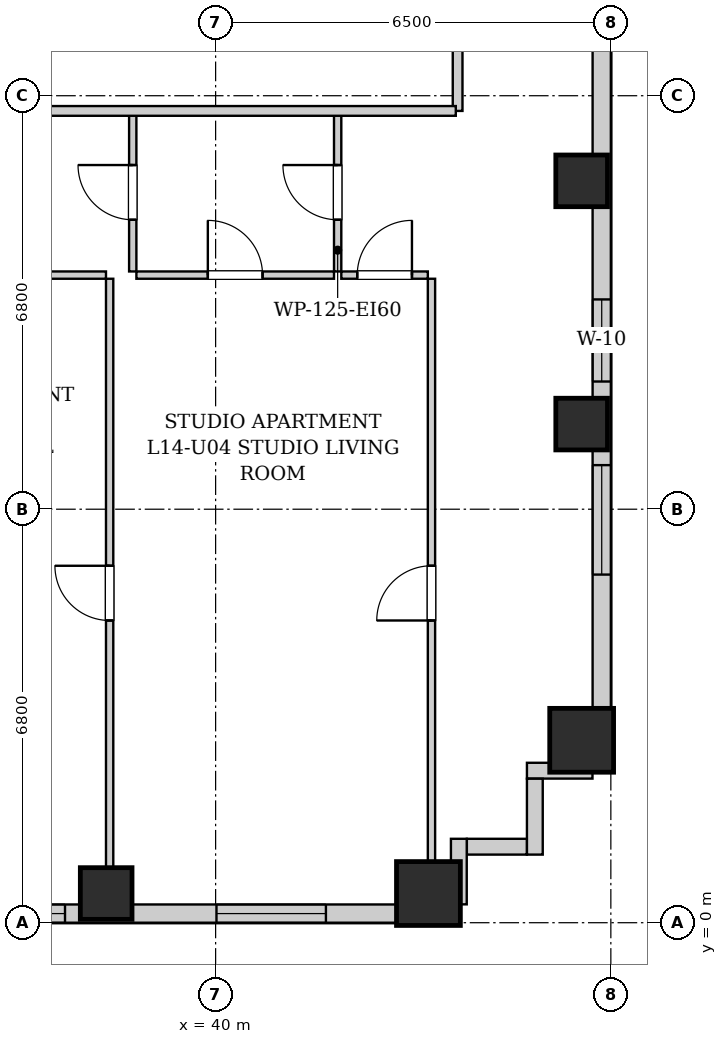
"""IFC4 building model, lengths in metres.
Left out: names, types, materials, properties, quantities, classifications, styles, units other than length and angle.
Written with IfcOpenShell. Run it as: python <this file> out.ifc"""

import sys

from ifc_helpers import new_model, si_unit, direction, frame, frame_2d, origin, origin_2d, place, context, subcontext, project, spatial, rectangle, extrude, element, fill, save


model = new_model("IFC4")
c1 = context("Model", 3, precision=1e-05, world=origin(), true_north=direction((0.0, 1.0)))
c2 = subcontext(c1, "Body", "Model", "MODEL_VIEW")
j1 = project(units=[si_unit("LENGTHUNIT", "METRE"), si_unit("PLANEANGLEUNIT", "RADIAN")], contexts=[c1])
p1 = place(None, origin())
s1 = spatial("IfcSite", under=j1, at=p1, CompositionType="ELEMENT")
p2 = place(p1, origin())
s2 = spatial("IfcBuilding", under=s1, at=p2, CompositionType="ELEMENT")
p3 = place(p2, frame((0.0, 0.0, 54.6)))
s3 = spatial("IfcBuildingStorey", under=s2, at=p3, CompositionType="ELEMENT", Elevation=54.6)
p4 = place(p3, frame((38.2, 0.48, 0.0), z_axis=(0.0, 0.0, 1.0), x_axis=(1.0, 0.0, 0.0)))
e1 = element("IfcColumn", 1, at=p4, inside=s3, PredefinedType="COLUMN", context=c2, shape_type="SweptSolid", body=[
    extrude(rectangle(XDim=0.85, YDim=0.85, at=origin_2d()), origin(), (0.0, 0.0, 1.0), 3.2),
])
for number, where, z_axis, x_axis in (
    (2, (43.5, 0.48, 0.0), (0.0, 0.0, 1.0), (1.0, 0.0, 0.0)),
    (3, (46.02, 3.0, 0.0), (0.0, 0.0, 1.0), (1.0, 0.0, 0.0)),
):
    element("IfcColumn", number, at=place(p3, frame(where, z_axis=z_axis, x_axis=x_axis)), inside=s3, PredefinedType="COLUMN", context=c2, shape_type="SweptSolid", body=[
        extrude(rectangle(XDim=1.05, YDim=1.05, at=origin_2d()), origin(), (0.0, 0.0, 1.0), 3.2),
    ])
for number, where, z_axis, x_axis in (
    (4, (46.02, 8.2, 0.0), (0.0, 0.0, 1.0), (1.0, 0.0, 0.0)),
    (5, (46.02, 12.2, 0.0), (0.0, 0.0, 1.0), (1.0, 0.0, 0.0)),
):
    element("IfcColumn", number, at=place(p3, frame(where, z_axis=z_axis, x_axis=x_axis)), inside=s3, PredefinedType="COLUMN", context=c2, shape_type="SweptSolid", body=[
        extrude(rectangle(XDim=0.85, YDim=0.85, at=origin_2d()), origin(), (0.0, 0.0, 1.0), 3.2),
    ])
p5 = place(p3, frame((46.35, 45.1, 0.0), z_axis=(0.0, 0.0, 1.0), x_axis=(0.0, -1.0, 0.0)))
e6 = element("IfcWall", 6, at=p5, inside=s3, PredefinedType="SOLIDWALL", context=c2, shape_type="SweptSolid", body=[
    extrude(rectangle(XDim=42.6, YDim=0.3, at=frame_2d((21.3, 0.0))), origin(), (0.0, 0.0, 1.0), 1.975),
])
p6 = place(p5, frame((37.575, 0.0, 0.55)))
e7 = element("IfcOpeningElement", 7, at=p6, cuts=e6, PredefinedType="OPENING", context=c2, shape_type="SweptSolid", body=[
    extrude(rectangle(XDim=1.8, YDim=1.2, at=frame_2d((0.9, 0.6))), frame((0.0, 0.16, 0.0), z_axis=(0.0, -1.0, 0.0), x_axis=(1.0, 0.0, 0.0)), (0.0, 0.0, 1.0), 0.32),
])
p7 = place(p5, frame((34.85, 0.0, 0.55)))
e8 = element("IfcOpeningElement", 8, at=p7, cuts=e6, PredefinedType="OPENING", context=c2, shape_type="SweptSolid", body=[
    extrude(rectangle(XDim=1.35, YDim=1.2, at=frame_2d((0.675, 0.6))), frame((0.0, 0.16, 0.0), z_axis=(0.0, -1.0, 0.0), x_axis=(1.0, 0.0, 0.0)), (0.0, 0.0, 1.0), 0.32),
])
p8 = place(p5, frame((3.715, 0.0, 0.55)))
e9 = element("IfcOpeningElement", 9, at=p8, cuts=e6, PredefinedType="OPENING", context=c2, shape_type="SweptSolid", body=[
    extrude(rectangle(XDim=1.8, YDim=1.2, at=frame_2d((0.9, 0.6))), frame((0.0, 0.16, 0.0), z_axis=(0.0, -1.0, 0.0), x_axis=(1.0, 0.0, 0.0)), (0.0, 0.0, 1.0), 0.32),
])
p9 = place(p5, frame((1.185, 0.0, 0.55)))
e10 = element("IfcOpeningElement", 10, at=p9, cuts=e6, PredefinedType="OPENING", context=c2, shape_type="SweptSolid", body=[
    extrude(rectangle(XDim=1.35, YDim=1.2, at=frame_2d((0.675, 0.6))), frame((0.0, 0.16, 0.0), z_axis=(0.0, -1.0, 0.0), x_axis=(1.0, 0.0, 0.0)), (0.0, 0.0, 1.0), 0.32),
])
p10 = place(p5, frame((26.025, 0.0, 0.55)))
e11 = element("IfcOpeningElement", 11, at=p10, cuts=e6, PredefinedType="OPENING", context=c2, shape_type="SweptSolid", body=[
    extrude(rectangle(XDim=1.8, YDim=1.2, at=frame_2d((0.9, 0.6))), frame((0.0, 0.16, 0.0), z_axis=(0.0, -1.0, 0.0), x_axis=(1.0, 0.0, 0.0)), (0.0, 0.0, 1.0), 0.32),
])
p11 = place(p5, frame((28.085, 0.0, 0.55)))
e12 = element("IfcOpeningElement", 12, at=p11, cuts=e6, PredefinedType="OPENING", context=c2, shape_type="SweptSolid", body=[
    extrude(rectangle(XDim=1.35, YDim=1.2, at=frame_2d((0.675, 0.6))), frame((0.0, 0.16, 0.0), z_axis=(0.0, -1.0, 0.0), x_axis=(1.0, 0.0, 0.0)), (0.0, 0.0, 1.0), 0.32),
])
p12 = place(p5, frame((18.8, 0.0, 0.55)))
e13 = element("IfcOpeningElement", 13, at=p12, cuts=e6, PredefinedType="OPENING", context=c2, shape_type="SweptSolid", body=[
    extrude(rectangle(XDim=1.8, YDim=1.2, at=frame_2d((0.9, 0.6))), frame((0.0, 0.16, 0.0), z_axis=(0.0, -1.0, 0.0), x_axis=(1.0, 0.0, 0.0)), (0.0, 0.0, 1.0), 0.32),
])
p13 = place(p5, frame((16.685, 0.0, 0.55)))
e14 = element("IfcOpeningElement", 14, at=p13, cuts=e6, PredefinedType="OPENING", context=c2, shape_type="SweptSolid", body=[
    extrude(rectangle(XDim=1.35, YDim=1.2, at=frame_2d((0.675, 0.6))), frame((0.0, 0.16, 0.0), z_axis=(0.0, -1.0, 0.0), x_axis=(1.0, 0.0, 0.0)), (0.0, 0.0, 1.0), 0.32),
])
p14 = place(p3, frame((44.0, 0.15, 0.0), z_axis=(0.0, 0.0, 1.0), x_axis=(-1.0, 0.0, 0.0)))
e15 = element("IfcWall", 15, at=p14, inside=s3, PredefinedType="SOLIDWALL", context=c2, shape_type="SweptSolid", body=[
    extrude(rectangle(XDim=27.55, YDim=0.3, at=frame_2d((13.775, 0.0))), origin(), (0.0, 0.0, 1.0), 1.975),
])
p15 = place(p14, frame((23.64, 0.0, 0.55)))
e16 = element("IfcOpeningElement", 16, at=p15, cuts=e15, PredefinedType="OPENING", context=c2, shape_type="SweptSolid", body=[
    extrude(rectangle(XDim=1.8, YDim=1.2, at=frame_2d((0.9, 0.6))), frame((0.0, 0.16, 0.0), z_axis=(0.0, -1.0, 0.0), x_axis=(1.0, 0.0, 0.0)), (0.0, 0.0, 1.0), 0.32),
])
p16 = place(p14, frame((21.5, 0.0, 0.55)))
e17 = element("IfcOpeningElement", 17, at=p16, cuts=e15, PredefinedType="OPENING", context=c2, shape_type="SweptSolid", body=[
    extrude(rectangle(XDim=0.85, YDim=1.2, at=frame_2d((0.425, 0.6))), frame((0.0, 0.16, 0.0), z_axis=(0.0, -1.0, 0.0), x_axis=(1.0, 0.0, 0.0)), (0.0, 0.0, 1.0), 0.32),
])
p17 = place(p14, frame((15.65, 0.0, 0.55)))
e18 = element("IfcOpeningElement", 18, at=p17, cuts=e15, PredefinedType="OPENING", context=c2, shape_type="SweptSolid", body=[
    extrude(rectangle(XDim=0.85, YDim=1.2, at=frame_2d((0.425, 0.6))), frame((0.0, 0.16, 0.0), z_axis=(0.0, -1.0, 0.0), x_axis=(1.0, 0.0, 0.0)), (0.0, 0.0, 1.0), 0.32),
])
p18 = place(p14, frame((12.875, 0.0, 0.55)))
e19 = element("IfcOpeningElement", 19, at=p18, cuts=e15, PredefinedType="OPENING", context=c2, shape_type="SweptSolid", body=[
    extrude(rectangle(XDim=1.8, YDim=1.2, at=frame_2d((0.9, 0.6))), frame((0.0, 0.16, 0.0), z_axis=(0.0, -1.0, 0.0), x_axis=(1.0, 0.0, 0.0)), (0.0, 0.0, 1.0), 0.32),
])
p19 = place(p14, frame((9.365, 0.0, 0.55)))
e20 = element("IfcOpeningElement", 20, at=p19, cuts=e15, PredefinedType="OPENING", context=c2, shape_type="SweptSolid", body=[
    extrude(rectangle(XDim=0.85, YDim=1.2, at=frame_2d((0.425, 0.6))), frame((0.0, 0.16, 0.0), z_axis=(0.0, -1.0, 0.0), x_axis=(1.0, 0.0, 0.0)), (0.0, 0.0, 1.0), 0.32),
])
p20 = place(p14, frame((6.477, 0.0, 0.55)))
e21 = element("IfcOpeningElement", 21, at=p20, cuts=e15, PredefinedType="OPENING", context=c2, shape_type="SweptSolid", body=[
    extrude(rectangle(XDim=1.8, YDim=1.2, at=frame_2d((0.9, 0.6))), frame((0.0, 0.16, 0.0), z_axis=(0.0, -1.0, 0.0), x_axis=(1.0, 0.0, 0.0)), (0.0, 0.0, 1.0), 0.32),
])
p21 = place(p14, frame((2.186, 0.0, 0.55)))
e22 = element("IfcOpeningElement", 22, at=p21, cuts=e15, PredefinedType="OPENING", context=c2, shape_type="SweptSolid", body=[
    extrude(rectangle(XDim=1.8, YDim=1.2, at=frame_2d((0.9, 0.6))), frame((0.0, 0.16, 0.0), z_axis=(0.0, -1.0, 0.0), x_axis=(1.0, 0.0, 0.0)), (0.0, 0.0, 1.0), 0.32),
])
p22 = place(p3, frame((46.198, 2.5, 0.0), z_axis=(0.0, 0.0, 1.0), x_axis=(-1.0, 0.0, 0.0)))
e23 = element("IfcWall", 23, at=p22, inside=s3, PredefinedType="SOLIDWALL", context=c2, shape_type="SweptSolid", body=[
    extrude(rectangle(XDim=1.078, YDim=0.26, at=frame_2d((0.539, 0.0))), origin(), (0.0, 0.0, 1.0), 2.94),
])
p23 = place(p3, frame((45.25, 2.368, 0.0), z_axis=(0.0, 0.0, 1.0), x_axis=(0.0, -1.0, 0.0)))
e24 = element("IfcWall", 24, at=p23, inside=s3, PredefinedType="SOLIDWALL", context=c2, shape_type="SweptSolid", body=[
    extrude(rectangle(XDim=1.248, YDim=0.26, at=frame_2d((0.624, 0.0))), origin(), (0.0, 0.0, 1.0), 2.94),
])
p24 = place(p3, frame((45.118, 1.25, 0.0), z_axis=(0.0, 0.0, 1.0), x_axis=(-1.0, 0.0, 0.0)))
e25 = element("IfcWall", 25, at=p24, inside=s3, PredefinedType="SOLIDWALL", context=c2, shape_type="SweptSolid", body=[
    extrude(rectangle(XDim=0.986, YDim=0.26, at=frame_2d((0.493, 0.0))), origin(), (0.0, 0.0, 1.0), 2.94),
])
p25 = place(p3, frame((44.0, 1.38, 0.0), z_axis=(0.0, 0.0, 1.0), x_axis=(0.0, -1.0, 0.0)))
e26 = element("IfcWall", 26, at=p25, inside=s3, PredefinedType="SOLIDWALL", context=c2, shape_type="SweptSolid", body=[
    extrude(rectangle(XDim=1.078, YDim=0.26, at=frame_2d((0.539, 0.0))), origin(), (0.0, 0.0, 1.0), 2.94),
])
p26 = place(p3, frame((43.98, 13.35, 0.0), z_axis=(0.0, 0.0, 1.0), x_axis=(0.0, 1.0, 0.0)))
e27 = element("IfcWall", 27, at=p26, inside=s3, PredefinedType="PARTITIONING", context=c2, shape_type="SweptSolid", body=[
    extrude(rectangle(XDim=1.74, YDim=0.16, at=frame_2d((0.87, 0.0))), origin(), (0.0, 0.0, 1.0), 2.94),
])
p27 = place(p3, frame((38.637, 10.71, 0.0), z_axis=(0.0, 0.0, 1.0), x_axis=(0.0, 1.0, 0.0)))
e28 = element("IfcWall", 28, at=p27, inside=s3, PredefinedType="PARTITIONING", context=c2, shape_type="SweptSolid", body=[
    extrude(rectangle(XDim=2.6, YDim=0.12, at=frame_2d((1.3, 0.0))), origin(), (0.0, 0.0, 1.0), 2.94),
])
p28 = place(p27, frame((0.85, 0.0, 0.0)))
e29 = element("IfcOpeningElement", 29, at=p28, cuts=e28, PredefinedType="OPENING", context=c2, shape_type="SweptSolid", body=[
    extrude(rectangle(XDim=0.9, YDim=2.05, at=frame_2d((0.45, 1.025))), frame((0.0, 0.07, 0.0), z_axis=(0.0, -1.0, 0.0), x_axis=(1.0, 0.0, 0.0)), (0.0, 0.0, 1.0), 0.14),
])
p29 = place(p3, frame((35.097, 10.65, 0.0), z_axis=(0.0, 0.0, 1.0), x_axis=(1.0, 0.0, 0.0)))
e30 = element("IfcWall", 30, at=p29, inside=s3, PredefinedType="PARTITIONING", context=c2, shape_type="SweptSolid", body=[
    extrude(rectangle(XDim=3.1, YDim=0.12, at=frame_2d((1.55, 0.0))), origin(), (0.0, 0.0, 1.0), 2.94),
])
p30 = place(p29, frame((1.1, 0.0, 0.0)))
e31 = element("IfcOpeningElement", 31, at=p30, cuts=e30, PredefinedType="OPENING", context=c2, shape_type="SweptSolid", body=[
    extrude(rectangle(XDim=0.9, YDim=2.05, at=frame_2d((0.45, 1.025))), frame((0.0, 0.07, 0.0), z_axis=(0.0, -1.0, 0.0), x_axis=(1.0, 0.0, 0.0)), (0.0, 0.0, 1.0), 0.14),
])
p31 = place(p3, frame((42.007, 10.71, 0.0), z_axis=(0.0, 0.0, 1.0), x_axis=(0.0, 1.0, 0.0)))
e32 = element("IfcWall", 32, at=p31, inside=s3, PredefinedType="PARTITIONING", context=c2, shape_type="SweptSolid", body=[
    extrude(rectangle(XDim=2.6, YDim=0.12, at=frame_2d((1.3, 0.0))), origin(), (0.0, 0.0, 1.0), 2.94),
])
p32 = place(p31, frame((0.85, 0.0, 0.0)))
e33 = element("IfcOpeningElement", 33, at=p32, cuts=e32, PredefinedType="OPENING", context=c2, shape_type="SweptSolid", body=[
    extrude(rectangle(XDim=0.9, YDim=2.05, at=frame_2d((0.45, 1.025))), frame((0.0, 0.07, 0.0), z_axis=(0.0, -1.0, 0.0), x_axis=(1.0, 0.0, 0.0)), (0.0, 0.0, 1.0), 0.14),
])
p33 = place(p3, frame((38.697, 10.65, 0.0), z_axis=(0.0, 0.0, 1.0), x_axis=(1.0, 0.0, 0.0)))
e34 = element("IfcWall", 34, at=p33, inside=s3, PredefinedType="PARTITIONING", context=c2, shape_type="SweptSolid", body=[
    extrude(rectangle(XDim=3.25, YDim=0.12, at=frame_2d((1.625, 0.0))), origin(), (0.0, 0.0, 1.0), 2.94),
])
p34 = place(p33, frame((1.175, 0.0, 0.0)))
e35 = element("IfcOpeningElement", 35, at=p34, cuts=e34, PredefinedType="OPENING", context=c2, shape_type="SweptSolid", body=[
    extrude(rectangle(XDim=0.9, YDim=2.05, at=frame_2d((0.45, 1.025))), frame((0.0, 0.07, 0.0), z_axis=(0.0, -1.0, 0.0), x_axis=(1.0, 0.0, 0.0)), (0.0, 0.0, 1.0), 0.14),
])
p35 = place(p3, frame((42.067, 10.65, 0.0), z_axis=(0.0, 0.0, 1.0), x_axis=(1.0, 0.0, 0.0)))
e36 = element("IfcWall", 36, at=p35, inside=s3, PredefinedType="PARTITIONING", context=c2, shape_type="SweptSolid", body=[
    extrude(rectangle(XDim=1.423, YDim=0.12, at=frame_2d((0.711, 0.0))), origin(), (0.0, 0.0, 1.0), 2.94),
])
p36 = place(p35, frame((0.262, 0.0, 0.0)))
e37 = element("IfcOpeningElement", 37, at=p36, cuts=e36, PredefinedType="OPENING", context=c2, shape_type="SweptSolid", body=[
    extrude(rectangle(XDim=0.9, YDim=2.05, at=frame_2d((0.45, 1.025))), frame((0.0, 0.07, 0.0), z_axis=(0.0, -1.0, 0.0), x_axis=(1.0, 0.0, 0.0)), (0.0, 0.0, 1.0), 0.14),
])
p37 = place(p3, frame((38.257, 0.28, 0.0), z_axis=(0.0, 0.0, 1.0), x_axis=(0.0, 1.0, 0.0)))
e38 = element("IfcWall", 38, at=p37, inside=s3, PredefinedType="PARTITIONING", context=c2, shape_type="SweptSolid", body=[
    extrude(rectangle(XDim=10.31, YDim=0.12, at=frame_2d((5.155, 0.0))), origin(), (0.0, 0.0, 1.0), 2.94),
])
p38 = place(p37, frame((4.69, 0.0, 0.0)))
e39 = element("IfcOpeningElement", 39, at=p38, cuts=e38, PredefinedType="OPENING", context=c2, shape_type="SweptSolid", body=[
    extrude(rectangle(XDim=0.9, YDim=2.05, at=frame_2d((0.45, 1.025))), frame((0.0, 0.07, 0.0), z_axis=(0.0, -1.0, 0.0), x_axis=(1.0, 0.0, 0.0)), (0.0, 0.0, 1.0), 0.14),
])
p39 = place(p3, frame((43.55, 0.28, 0.0), z_axis=(0.0, 0.0, 1.0), x_axis=(0.0, 1.0, 0.0)))
e40 = element("IfcWall", 40, at=p39, inside=s3, PredefinedType="PARTITIONING", context=c2, shape_type="SweptSolid", body=[
    extrude(rectangle(XDim=10.31, YDim=0.12, at=frame_2d((5.155, 0.0))), origin(), (0.0, 0.0, 1.0), 2.94),
])
p40 = place(p39, frame((4.69, 0.0, 0.0)))
e41 = element("IfcOpeningElement", 41, at=p40, cuts=e40, PredefinedType="OPENING", context=c2, shape_type="SweptSolid", body=[
    extrude(rectangle(XDim=0.9, YDim=2.05, at=frame_2d((0.45, 1.025))), frame((0.0, 0.07, 0.0), z_axis=(0.0, -1.0, 0.0), x_axis=(1.0, 0.0, 0.0)), (0.0, 0.0, 1.0), 0.14),
])
p41 = place(p3, frame((10.05, 13.35, 0.0), z_axis=(0.0, 0.0, 1.0), x_axis=(1.0, 0.0, 0.0)))
e42 = element("IfcWall", 42, at=p41, inside=s3, PredefinedType="PARTITIONING", context=c2, shape_type="SweptSolid", body=[
    extrude(rectangle(XDim=33.9, YDim=0.16, at=frame_2d((16.95, 0.0))), origin(), (0.0, 0.0, 1.0), 2.94),
])
p42 = place(p41, frame((0.813, 0.0, 0.0)))
e43 = element("IfcOpeningElement", 43, at=p42, cuts=e42, PredefinedType="OPENING", context=c2, shape_type="SweptSolid", body=[
    extrude(rectangle(XDim=0.95, YDim=2.1, at=frame_2d((0.475, 1.05))), frame((0.0, 0.09, 0.0), z_axis=(0.0, -1.0, 0.0), x_axis=(1.0, 0.0, 0.0)), (0.0, 0.0, 1.0), 0.18),
])
p43 = place(p41, frame((6.04, 0.0, 0.0)))
e44 = element("IfcOpeningElement", 44, at=p43, cuts=e42, PredefinedType="OPENING", context=c2, shape_type="SweptSolid", body=[
    extrude(rectangle(XDim=0.95, YDim=2.1, at=frame_2d((0.475, 1.05))), frame((0.0, 0.09, 0.0), z_axis=(0.0, -1.0, 0.0), x_axis=(1.0, 0.0, 0.0)), (0.0, 0.0, 1.0), 0.18),
])
p44 = place(p41, frame((18.09, 0.0, 0.0)))
e45 = element("IfcOpeningElement", 45, at=p44, cuts=e42, PredefinedType="OPENING", context=c2, shape_type="SweptSolid", body=[
    extrude(rectangle(XDim=0.95, YDim=2.1, at=frame_2d((0.475, 1.05))), frame((0.0, 0.09, 0.0), z_axis=(0.0, -1.0, 0.0), x_axis=(1.0, 0.0, 0.0)), (0.0, 0.0, 1.0), 0.18),
])
p45 = place(p41, frame((25.962, 0.0, 0.0)))
e46 = element("IfcOpeningElement", 46, at=p45, cuts=e42, PredefinedType="OPENING", context=c2, shape_type="SweptSolid", body=[
    extrude(rectangle(XDim=0.95, YDim=2.1, at=frame_2d((0.475, 1.05))), frame((0.0, 0.09, 0.0), z_axis=(0.0, -1.0, 0.0), x_axis=(1.0, 0.0, 0.0)), (0.0, 0.0, 1.0), 0.18),
])
p46 = place(p28, origin())
e47 = element("IfcDoor", 47, at=p46, inside=s3, OperationType="SINGLE_SWING_RIGHT", PredefinedType="DOOR", context=c2, shape_type="SweptSolid", body=[
    extrude(rectangle(XDim=0.9, YDim=2.05, at=frame_2d((0.45, 1.025))), frame((0.0, 0.025, 0.0), z_axis=(0.0, -1.0, 0.0), x_axis=(1.0, 0.0, 0.0)), (0.0, 0.0, 1.0), 0.05),
])
fill(e29, e47)
p47 = place(p32, origin())
e48 = element("IfcDoor", 48, at=p47, inside=s3, OperationType="SINGLE_SWING_RIGHT", PredefinedType="DOOR", context=c2, shape_type="SweptSolid", body=[
    extrude(rectangle(XDim=0.9, YDim=2.05, at=frame_2d((0.45, 1.025))), frame((0.0, 0.025, 0.0), z_axis=(0.0, -1.0, 0.0), x_axis=(1.0, 0.0, 0.0)), (0.0, 0.0, 1.0), 0.05),
])
fill(e33, e48)
p48 = place(p34, origin())
e49 = element("IfcDoor", 49, at=p48, inside=s3, OperationType="SINGLE_SWING_LEFT", PredefinedType="DOOR", context=c2, shape_type="SweptSolid", body=[
    extrude(rectangle(XDim=0.9, YDim=2.05, at=frame_2d((0.45, 1.025))), frame((0.0, 0.025, 0.0), z_axis=(0.0, -1.0, 0.0), x_axis=(1.0, 0.0, 0.0)), (0.0, 0.0, 1.0), 0.05),
])
fill(e35, e49)
p49 = place(p36, origin())
e50 = element("IfcDoor", 50, at=p49, inside=s3, OperationType="SINGLE_SWING_RIGHT", PredefinedType="DOOR", context=c2, shape_type="SweptSolid", body=[
    extrude(rectangle(XDim=0.9, YDim=2.05, at=frame_2d((0.45, 1.025))), frame((0.0, 0.025, 0.0), z_axis=(0.0, -1.0, 0.0), x_axis=(1.0, 0.0, 0.0)), (0.0, 0.0, 1.0), 0.05),
])
fill(e37, e50)
p50 = place(p38, origin())
e51 = element("IfcDoor", 51, at=p50, inside=s3, OperationType="SINGLE_SWING_RIGHT", PredefinedType="DOOR", context=c2, shape_type="SweptSolid", body=[
    extrude(rectangle(XDim=0.9, YDim=2.05, at=frame_2d((0.45, 1.025))), frame((0.0, 0.025, 0.0), z_axis=(0.0, -1.0, 0.0), x_axis=(1.0, 0.0, 0.0)), (0.0, 0.0, 1.0), 0.05),
])
fill(e39, e51)
p51 = place(p40, origin())
e52 = element("IfcDoor", 52, at=p51, inside=s3, OperationType="SINGLE_SWING_LEFT", PredefinedType="DOOR", context=c2, shape_type="SweptSolid", body=[
    extrude(rectangle(XDim=0.9, YDim=2.05, at=frame_2d((0.45, 1.025))), frame((0.0, 0.025, 0.0), z_axis=(0.0, -1.0, 0.0), x_axis=(1.0, 0.0, 0.0)), (0.0, 0.0, 1.0), 0.05),
])
fill(e41, e52)
p52 = place(p20, origin())
e53 = element("IfcWindow", 53, at=p52, inside=s3, PartitioningType="DOUBLE_PANEL_VERTICAL", PredefinedType="WINDOW", context=c2, shape_type="SweptSolid", body=[
    extrude(rectangle(XDim=1.8, YDim=1.2, at=frame_2d((0.9, 0.6))), frame((0.0, 0.03, 0.0), z_axis=(0.0, -1.0, 0.0), x_axis=(1.0, 0.0, 0.0)), (0.0, 0.0, 1.0), 0.06),
])
fill(e21, e53)
p53 = place(p21, origin())
e54 = element("IfcWindow", 54, at=p53, inside=s3, PartitioningType="DOUBLE_PANEL_VERTICAL", PredefinedType="WINDOW", context=c2, shape_type="SweptSolid", body=[
    extrude(rectangle(XDim=1.8, YDim=1.2, at=frame_2d((0.9, 0.6))), frame((0.0, 0.03, 0.0), z_axis=(0.0, -1.0, 0.0), x_axis=(1.0, 0.0, 0.0)), (0.0, 0.0, 1.0), 0.06),
])
fill(e22, e54)
p54 = place(p6, origin())
e55 = element("IfcWindow", 55, at=p54, inside=s3, PartitioningType="DOUBLE_PANEL_VERTICAL", PredefinedType="WINDOW", context=c2, shape_type="SweptSolid", body=[
    extrude(rectangle(XDim=1.8, YDim=1.2, at=frame_2d((0.9, 0.6))), frame((0.0, 0.03, 0.0), z_axis=(0.0, -1.0, 0.0), x_axis=(1.0, 0.0, 0.0)), (0.0, 0.0, 1.0), 0.06),
])
fill(e7, e55)
p55 = place(p7, origin())
e56 = element("IfcWindow", 56, at=p55, inside=s3, PartitioningType="SINGLE_PANEL", PredefinedType="WINDOW", context=c2, shape_type="SweptSolid", body=[
    extrude(rectangle(XDim=1.35, YDim=1.2, at=frame_2d((0.675, 0.6))), frame((0.0, 0.03, 0.0), z_axis=(0.0, -1.0, 0.0), x_axis=(1.0, 0.0, 0.0)), (0.0, 0.0, 1.0), 0.06),
])
fill(e8, e56)
save(model, sys.argv[1])
